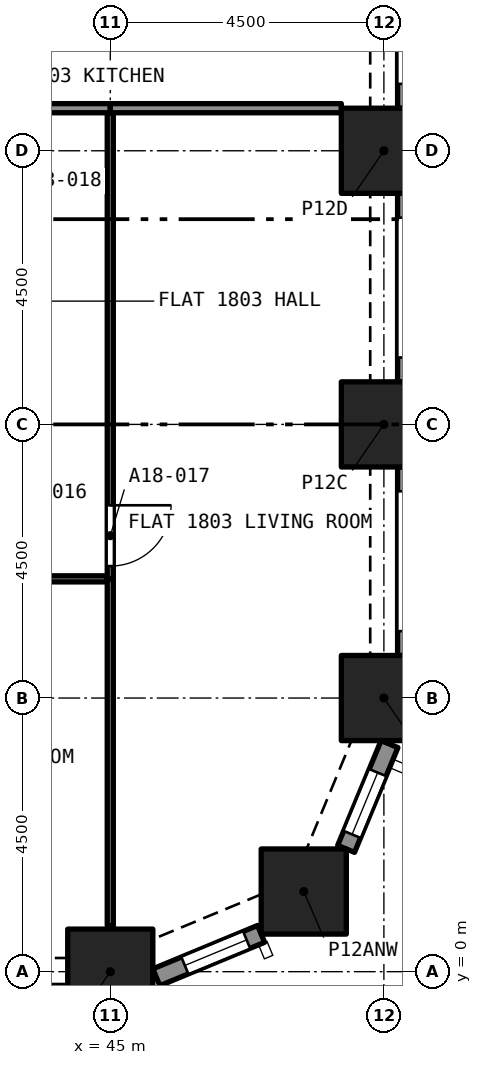
"""IFC4 building model, lengths in metres.
Left out: names, types, materials, properties, quantities, classifications, styles, units other than length and angle.
Written with IfcOpenShell. Run it as: python <this file> out.ifc"""

import sys

from ifc_helpers import new_model, si_unit, direction, frame, frame_2d, origin, origin_2d, place, context, subcontext, project, spatial, rectangle, extrude, element, fill, save


model = new_model("IFC4")
c1 = context("Model", 3, precision=1e-05, world=origin(), true_north=direction((0.0, 1.0)))
c2 = subcontext(c1, "Body", "Model", "MODEL_VIEW")
j1 = project(units=[si_unit("LENGTHUNIT", "METRE"), si_unit("PLANEANGLEUNIT", "RADIAN")], contexts=[c1])
p1 = place(None, origin())
s1 = spatial("IfcSite", under=j1, at=p1, CompositionType="ELEMENT")
p2 = place(p1, origin())
s2 = spatial("IfcBuilding", under=s1, at=p2, CompositionType="ELEMENT")
p3 = place(p2, frame((0.0, 0.0, 68.8)))
s3 = spatial("IfcBuildingStorey", under=s2, at=p3, CompositionType="ELEMENT", Elevation=68.8)
for number, where, z_axis, x_axis in (
    (1, (45.0, 0.0, 0.0), (0.0, 0.0, 1.0), (1.0, 0.0, 0.0)),
    (2, (48.182, 1.318, 0.0), (0.0, 0.0, 1.0), (1.0, 0.0, 0.0)),
    (3, (49.5, 4.5, 0.0), (0.0, 0.0, 1.0), (1.0, 0.0, 0.0)),
    (4, (49.5, 9.0, 0.0), (0.0, 0.0, 1.0), (1.0, 0.0, 0.0)),
    (5, (49.5, 13.5, 0.0), (0.0, 0.0, 1.0), (1.0, 0.0, 0.0)),
):
    element("IfcColumn", number, at=place(p3, frame(where, z_axis=z_axis, x_axis=x_axis)), inside=s3, PredefinedType="COLUMN", context=c2, shape_type="SweptSolid", body=[
        extrude(rectangle(XDim=1.4, YDim=1.4, at=origin_2d()), origin(), (0.0, 0.0, 1.0), 3.2),
    ])
p4 = place(p3, frame((47.48, 0.622, 0.0), z_axis=(0.0, 0.0, 1.0), x_axis=(-0.923903565336, -0.38262540684, 0.0)))
e6 = element("IfcWall", 6, at=p4, inside=s3, PredefinedType="SOLIDWALL", context=c2, shape_type="SweptSolid", body=[
    extrude(rectangle(XDim=1.865, YDim=0.3, at=frame_2d((0.933, 0.0))), origin(), (0.0, 0.0, 1.0), 3.2),
])
p5 = place(p4, frame((0.258, 0.0, 0.45)))
e7 = element("IfcOpeningElement", 7, at=p5, cuts=e6, PredefinedType="OPENING", context=c2, shape_type="SweptSolid", body=[
    extrude(rectangle(XDim=1.1, YDim=1.95, at=frame_2d((0.55, 0.975))), frame((0.0, 0.16, 0.0), z_axis=(0.0, -1.0, 0.0), x_axis=(1.0, 0.0, 0.0)), (0.0, 0.0, 1.0), 0.32),
])
p6 = place(p3, frame((49.592, 3.743, 0.0), z_axis=(0.0, 0.0, 1.0), x_axis=(-0.382737135771, -0.923857286003, 0.0)))
e8 = element("IfcWall", 8, at=p6, inside=s3, PredefinedType="SOLIDWALL", context=c2, shape_type="SweptSolid", body=[
    extrude(rectangle(XDim=1.865, YDim=0.3, at=frame_2d((0.933, 0.0))), origin(), (0.0, 0.0, 1.0), 3.2),
])
p7 = place(p6, frame((0.508, 0.0, 0.45)))
e9 = element("IfcOpeningElement", 9, at=p7, cuts=e8, PredefinedType="OPENING", context=c2, shape_type="SweptSolid", body=[
    extrude(rectangle(XDim=1.1, YDim=1.95, at=frame_2d((0.55, 0.975))), frame((0.0, 0.16, 0.0), z_axis=(0.0, -1.0, 0.0), x_axis=(1.0, 0.0, 0.0)), (0.0, 0.0, 1.0), 0.32),
])
p8 = place(p3, frame((49.875, 8.3, 0.0), z_axis=(0.0, 0.0, 1.0), x_axis=(0.0, -1.0, 0.0)))
e10 = element("IfcWall", 10, at=p8, inside=s3, PredefinedType="SOLIDWALL", context=c2, shape_type="SweptSolid", body=[
    extrude(rectangle(XDim=3.1, YDim=0.3, at=frame_2d((1.55, 0.0))), origin(), (0.0, 0.0, 1.0), 3.2),
])
p9 = place(p8, frame((0.4, 0.0, 0.45)))
e11 = element("IfcOpeningElement", 11, at=p9, cuts=e10, PredefinedType="OPENING", context=c2, shape_type="SweptSolid", body=[
    extrude(rectangle(XDim=2.3, YDim=1.95, at=frame_2d((1.15, 0.975))), frame((0.0, 0.16, 0.0), z_axis=(0.0, -1.0, 0.0), x_axis=(1.0, 0.0, 0.0)), (0.0, 0.0, 1.0), 0.32),
])
p10 = place(p3, frame((49.875, 12.8, 0.0), z_axis=(0.0, 0.0, 1.0), x_axis=(0.0, -1.0, 0.0)))
e12 = element("IfcWall", 12, at=p10, inside=s3, PredefinedType="SOLIDWALL", context=c2, shape_type="SweptSolid", body=[
    extrude(rectangle(XDim=3.1, YDim=0.3, at=frame_2d((1.55, 0.0))), origin(), (0.0, 0.0, 1.0), 3.2),
])
p11 = place(p10, frame((0.4, 0.0, 0.45)))
e13 = element("IfcOpeningElement", 13, at=p11, cuts=e12, PredefinedType="OPENING", context=c2, shape_type="SweptSolid", body=[
    extrude(rectangle(XDim=2.3, YDim=1.95, at=frame_2d((1.15, 0.975))), frame((0.0, 0.16, 0.0), z_axis=(0.0, -1.0, 0.0), x_axis=(1.0, 0.0, 0.0)), (0.0, 0.0, 1.0), 0.32),
])
p12 = place(p3, frame((49.875, 17.3, 0.0), z_axis=(0.0, 0.0, 1.0), x_axis=(0.0, -1.0, 0.0)))
e14 = element("IfcWall", 14, at=p12, inside=s3, PredefinedType="SOLIDWALL", context=c2, shape_type="SweptSolid", body=[
    extrude(rectangle(XDim=3.1, YDim=0.3, at=frame_2d((1.55, 0.0))), origin(), (0.0, 0.0, 1.0), 3.2),
])
p13 = place(p12, frame((0.4, 0.0, 0.45)))
e15 = element("IfcOpeningElement", 15, at=p13, cuts=e14, PredefinedType="OPENING", context=c2, shape_type="SweptSolid", body=[
    extrude(rectangle(XDim=2.3, YDim=1.95, at=frame_2d((1.15, 0.975))), frame((0.0, 0.16, 0.0), z_axis=(0.0, -1.0, 0.0), x_axis=(1.0, 0.0, 0.0)), (0.0, 0.0, 1.0), 0.32),
])
p14 = place(p3, frame((44.95, 6.46, 0.0), z_axis=(0.0, 0.0, 1.0), x_axis=(-1.0, 0.0, 0.0)))
e16 = element("IfcWall", 16, at=p14, inside=s3, PredefinedType="PARTITIONING", context=c2, shape_type="SweptSolid", body=[
    extrude(rectangle(XDim=4.35, YDim=0.1, at=frame_2d((2.175, 0.0))), origin(), (0.0, 0.0, 1.0), 2.9),
])
p15 = place(p14, frame((1.75, 0.0, 0.0)))
e17 = element("IfcOpeningElement", 17, at=p15, cuts=e16, PredefinedType="OPENING", context=c2, shape_type="SweptSolid", body=[
    extrude(rectangle(XDim=0.9, YDim=2.1, at=frame_2d((0.45, 1.05))), frame((0.0, 0.06, 0.0), z_axis=(0.0, -1.0, 0.0), x_axis=(1.0, 0.0, 0.0)), (0.0, 0.0, 1.0), 0.12),
])
p16 = place(p3, frame((45.0, 0.758, 0.0), z_axis=(0.0, 0.0, 1.0), x_axis=(0.0, 1.0, 0.0)))
e18 = element("IfcWall", 18, at=p16, inside=s3, PredefinedType="PARTITIONING", context=c2, shape_type="SweptSolid", body=[
    extrude(rectangle(XDim=5.702, YDim=0.1, at=frame_2d((2.851, 0.0))), origin(), (0.0, 0.0, 1.0), 2.9),
])
p17 = place(p3, frame((45.0, 14.125, 0.0), z_axis=(0.0, 0.0, 1.0), x_axis=(0.0, -1.0, 0.0)))
e19 = element("IfcWall", 19, at=p17, inside=s3, PredefinedType="PARTITIONING", context=c2, shape_type="SweptSolid", body=[
    extrude(rectangle(XDim=7.665, YDim=0.1, at=frame_2d((3.833, 0.0))), origin(), (0.0, 0.0, 1.0), 2.9),
])
p18 = place(p17, frame((6.455, 0.0, 0.0)))
e20 = element("IfcOpeningElement", 20, at=p18, cuts=e19, PredefinedType="OPENING", context=c2, shape_type="SweptSolid", body=[
    extrude(rectangle(XDim=1.0, YDim=2.1, at=frame_2d((0.5, 1.05))), frame((0.0, 0.06, 0.0), z_axis=(0.0, -1.0, 0.0), x_axis=(1.0, 0.0, 0.0)), (0.0, 0.0, 1.0), 0.12),
])
p19 = place(p3, frame((45.0, 14.2, 0.0), z_axis=(0.0, 0.0, 1.0), x_axis=(-1.0, 0.0, 0.0)))
e21 = element("IfcWall", 21, at=p19, inside=s3, PredefinedType="PARTITIONING", context=c2, shape_type="SweptSolid", body=[
    extrude(rectangle(XDim=2.25, YDim=0.15, at=frame_2d((1.125, 0.0))), origin(), (0.0, 0.0, 1.0), 2.9),
])
p20 = place(p19, frame((1.0, 0.0, 0.0)))
e22 = element("IfcOpeningElement", 22, at=p20, cuts=e21, PredefinedType="OPENING", context=c2, shape_type="SweptSolid", body=[
    extrude(rectangle(XDim=1.0, YDim=2.1, at=frame_2d((0.5, 1.05))), frame((0.0, 0.085, 0.0), z_axis=(0.0, -1.0, 0.0), x_axis=(1.0, 0.0, 0.0)), (0.0, 0.0, 1.0), 0.17),
])
p21 = place(p3, frame((45.0, 14.2, 0.0), z_axis=(0.0, 0.0, 1.0), x_axis=(1.0, 0.0, 0.0)))
e23 = element("IfcWall", 23, at=p21, inside=s3, PredefinedType="PARTITIONING", context=c2, shape_type="SweptSolid", body=[
    extrude(rectangle(XDim=3.8, YDim=0.15, at=frame_2d((1.9, 0.0))), origin(), (0.0, 0.0, 1.0), 2.9),
])
p22 = place(p5, origin())
e24 = element("IfcWindow", 24, at=p22, inside=s3, PartitioningType="SINGLE_PANEL", PredefinedType="WINDOW", context=c2, shape_type="SweptSolid", body=[
    extrude(rectangle(XDim=1.1, YDim=1.95, at=frame_2d((0.55, 0.975))), frame((0.0, 0.03, 0.0), z_axis=(0.0, -1.0, 0.0), x_axis=(1.0, 0.0, 0.0)), (0.0, 0.0, 1.0), 0.06),
])
fill(e7, e24)
p23 = place(p7, origin())
e25 = element("IfcWindow", 25, at=p23, inside=s3, PartitioningType="SINGLE_PANEL", PredefinedType="WINDOW", context=c2, shape_type="SweptSolid", body=[
    extrude(rectangle(XDim=1.1, YDim=1.95, at=frame_2d((0.55, 0.975))), frame((0.0, 0.03, 0.0), z_axis=(0.0, -1.0, 0.0), x_axis=(1.0, 0.0, 0.0)), (0.0, 0.0, 1.0), 0.06),
])
fill(e9, e25)
p24 = place(p18, origin())
e26 = element("IfcDoor", 26, at=p24, inside=s3, OperationType="SINGLE_SWING_RIGHT", PredefinedType="DOOR", context=c2, shape_type="SweptSolid", body=[
    extrude(rectangle(XDim=1.0, YDim=2.1, at=frame_2d((0.5, 1.05))), frame((0.0, 0.025, 0.0), z_axis=(0.0, -1.0, 0.0), x_axis=(1.0, 0.0, 0.0)), (0.0, 0.0, 1.0), 0.05),
])
fill(e20, e26)
save(model, sys.argv[1])
